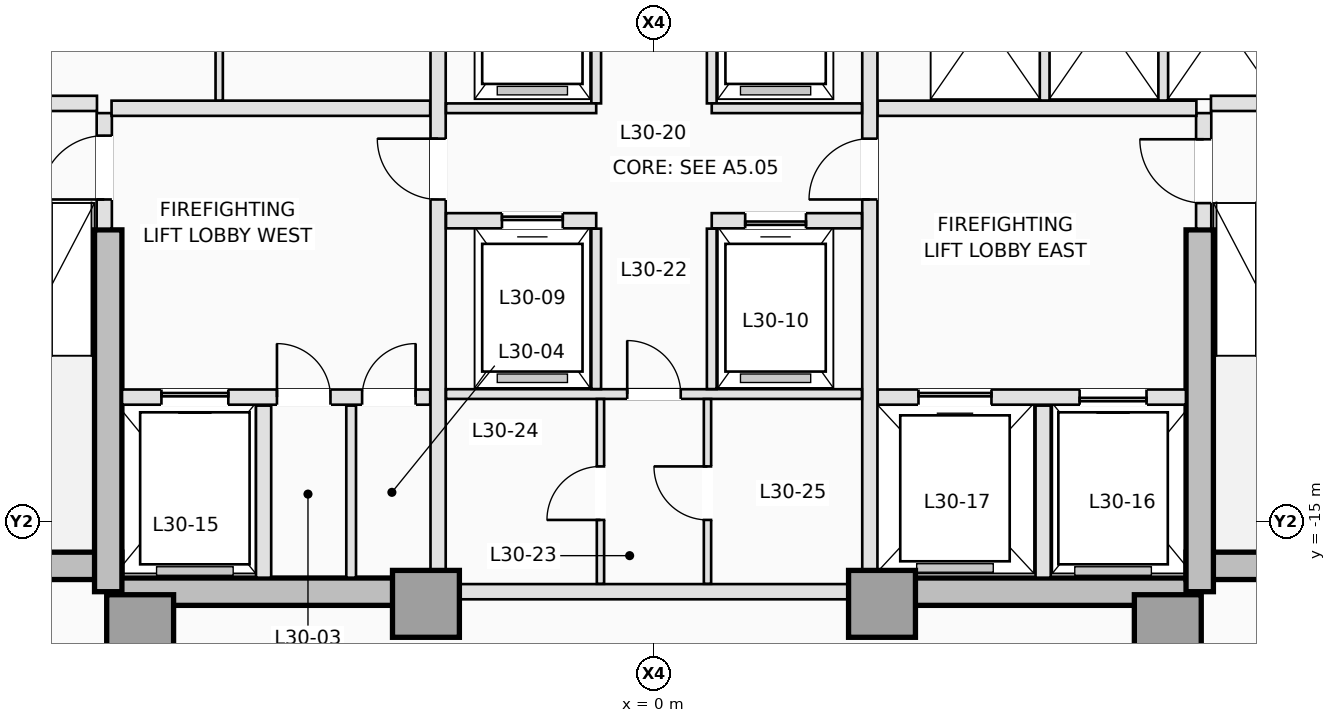
"""IFC4 building model, lengths in metres.
Left out: names, types, materials, properties, quantities, classifications, styles, units other than length and angle.
Written with IfcOpenShell. Run it as: python <this file> out.ifc"""

import sys

from ifc_helpers import new_model, si_unit, direction, frame, frame_2d, origin, origin_2d, place, context, subcontext, project, spatial, rectangle, extrude, element, fill, save


model = new_model("IFC4")
c1 = context("Model", 3, precision=1e-05, world=origin(), true_north=direction((0.0, 1.0)))
c2 = subcontext(c1, "Body", "Model", "MODEL_VIEW")
j1 = project(units=[si_unit("LENGTHUNIT", "METRE"), si_unit("PLANEANGLEUNIT", "RADIAN")], contexts=[c1])
p1 = place(None, origin())
s1 = spatial("IfcSite", under=j1, at=p1, CompositionType="ELEMENT")
p2 = place(p1, origin())
s2 = spatial("IfcBuilding", under=s1, at=p2, CompositionType="ELEMENT")
p3 = place(p2, frame((0.0, 0.0, 112.5)))
s3 = spatial("IfcBuildingStorey", under=s2, at=p3, CompositionType="ELEMENT", Elevation=112.5)
p4 = place(p3, frame((-12.65, -15.725, 0.0), z_axis=(0.0, 0.0, 1.0), x_axis=(1.0, 0.0, 0.0)))
e1 = element("IfcWall", 1, at=p4, inside=s3, PredefinedType="SHEAR", context=c2, shape_type="SweptSolid", body=[
    extrude(rectangle(XDim=3.9, YDim=0.45, at=frame_2d((1.95, 0.0))), origin(), (0.0, 0.0, 1.0), 3.5),
])
for number, where, z_axis, x_axis in (
    (2, (-8.975, -16.15, 0.0), (0.0, 0.0, 1.0), (1.0, 0.0, 0.0)),
    (3, (3.75, -16.15, 0.0), (0.0, 0.0, 1.0), (1.0, 0.0, 0.0)),
):
    element("IfcWall", number, at=place(p3, frame(where, z_axis=z_axis, x_axis=x_axis)), inside=s3, PredefinedType="SHEAR", context=c2, shape_type="SweptSolid", body=[
        extrude(rectangle(XDim=5.225, YDim=0.45, at=frame_2d((2.613, 0.0))), origin(), (0.0, 0.0, 1.0), 3.5),
    ])
p5 = place(p3, frame((8.75, -15.725, 0.0), z_axis=(0.0, 0.0, 1.0), x_axis=(1.0, 0.0, 0.0)))
e4 = element("IfcWall", 4, at=p5, inside=s3, PredefinedType="SHEAR", context=c2, shape_type="SweptSolid", body=[
    extrude(rectangle(XDim=3.9, YDim=0.45, at=frame_2d((1.95, 0.0))), origin(), (0.0, 0.0, 1.0), 3.5),
])
for number, where, z_axis, x_axis in (
    (5, (-8.975, -16.15, 0.0), (0.0, 0.0, 1.0), (0.0, 1.0, 0.0)),
    (6, (8.975, -16.15, 0.0), (0.0, 0.0, 1.0), (0.0, 1.0, 0.0)),
):
    element("IfcWall", number, at=place(p3, frame(where, z_axis=z_axis, x_axis=x_axis)), inside=s3, PredefinedType="SHEAR", context=c2, shape_type="SweptSolid", body=[
        extrude(rectangle(XDim=5.95, YDim=0.45, at=frame_2d((2.975, 0.0))), origin(), (0.0, 0.0, 1.0), 3.5),
    ])
for number, where, z_axis, x_axis in (
    (7, (-8.45, -16.75, 0.0), (0.0, 0.0, 1.0), (1.0, 0.0, 0.0)),
    (8, (-3.75, -16.35, 0.0), (0.0, 0.0, 1.0), (1.0, 0.0, 0.0)),
    (9, (3.75, -16.35, 0.0), (0.0, 0.0, 1.0), (1.0, 0.0, 0.0)),
    (10, (8.45, -16.75, 0.0), (0.0, 0.0, 1.0), (1.0, 0.0, 0.0)),
):
    element("IfcColumn", number, at=place(p3, frame(where, z_axis=z_axis, x_axis=x_axis)), inside=s3, PredefinedType="COLUMN", context=c2, shape_type="SweptSolid", body=[
        extrude(rectangle(XDim=1.1, YDim=1.1, at=origin_2d()), origin(), (0.0, 0.0, 1.0), 3.5),
    ])
p6 = place(p3, frame((-9.04, -10.18, 0.0), z_axis=(0.0, 0.0, 1.0), x_axis=(0.0, 1.0, 0.0)))
e11 = element("IfcWall", 11, at=p6, inside=s3, PredefinedType="PARTITIONING", context=c2, shape_type="SweptSolid", body=[
    extrude(rectangle(XDim=1.9, YDim=0.25, at=frame_2d((0.95, 0.0))), origin(), (0.0, 0.0, 1.0), 3.25),
])
p7 = place(p6, frame((0.48, 0.0, 0.0)))
e12 = element("IfcOpeningElement", 12, at=p7, cuts=e11, PredefinedType="OPENING", context=c2, shape_type="SweptSolid", body=[
    extrude(rectangle(XDim=1.05, YDim=2.15, at=frame_2d((0.525, 1.075))), frame((0.0, 0.135, 0.0), z_axis=(0.0, -1.0, 0.0), x_axis=(1.0, 0.0, 0.0)), (0.0, 0.0, 1.0), 0.27),
])
p8 = place(p3, frame((9.04, -10.18, 0.0), z_axis=(0.0, 0.0, 1.0), x_axis=(0.0, 1.0, 0.0)))
e13 = element("IfcWall", 13, at=p8, inside=s3, PredefinedType="PARTITIONING", context=c2, shape_type="SweptSolid", body=[
    extrude(rectangle(XDim=1.9, YDim=0.25, at=frame_2d((0.95, 0.0))), origin(), (0.0, 0.0, 1.0), 3.25),
])
p9 = place(p8, frame((0.42, 0.0, 0.0)))
e14 = element("IfcOpeningElement", 14, at=p9, cuts=e13, PredefinedType="OPENING", context=c2, shape_type="SweptSolid", body=[
    extrude(rectangle(XDim=1.05, YDim=2.15, at=frame_2d((0.525, 1.075))), frame((0.0, 0.135, 0.0), z_axis=(0.0, -1.0, 0.0), x_axis=(1.0, 0.0, 0.0)), (0.0, 0.0, 1.0), 0.27),
])
for number, where, z_axis, x_axis in (
    (15, (-12.38, -8.12, 0.0), (0.0, 0.0, 1.0), (1.0, 0.0, 0.0)),
    (16, (9.16, -8.12, 0.0), (0.0, 0.0, 1.0), (1.0, 0.0, 0.0)),
):
    element("IfcWall", number, at=place(p3, frame(where, z_axis=z_axis, x_axis=x_axis)), inside=s3, PredefinedType="PARTITIONING", context=c2, shape_type="SweptSolid", body=[
        extrude(rectangle(XDim=3.22, YDim=0.25, at=frame_2d((1.61, 0.0))), origin(), (0.0, 0.0, 1.0), 3.25),
    ])
p10 = place(p3, frame((-8.748, -12.95, 0.0), z_axis=(0.0, 0.0, 1.0), x_axis=(1.0, 0.0, 0.0)))
e17 = element("IfcWall", 17, at=p10, inside=s3, PredefinedType="PARTITIONING", context=c2, shape_type="SweptSolid", body=[
    extrude(rectangle(XDim=5.068, YDim=0.25, at=frame_2d((2.534, 0.0))), origin(), (0.0, 0.0, 1.0), 3.25),
])
p11 = place(p10, frame((0.648, 0.0, 0.0)))
e18 = element("IfcOpeningElement", 18, at=p11, cuts=e17, PredefinedType="OPENING", context=c2, shape_type="SweptSolid", body=[
    extrude(rectangle(XDim=1.1, YDim=2.15, at=frame_2d((0.55, 1.075))), frame((0.0, 0.135, 0.0), z_axis=(0.0, -1.0, 0.0), x_axis=(1.0, 0.0, 0.0)), (0.0, 0.0, 1.0), 0.27),
])
p12 = place(p10, frame((2.548, 0.0, 0.0)))
e19 = element("IfcOpeningElement", 19, at=p12, cuts=e17, PredefinedType="OPENING", context=c2, shape_type="SweptSolid", body=[
    extrude(rectangle(XDim=0.88, YDim=2.1, at=frame_2d((0.44, 1.05))), frame((0.0, 0.135, 0.0), z_axis=(0.0, -1.0, 0.0), x_axis=(1.0, 0.0, 0.0)), (0.0, 0.0, 1.0), 0.27),
])
p13 = place(p10, frame((3.948, 0.0, 0.0)))
e20 = element("IfcOpeningElement", 20, at=p13, cuts=e17, PredefinedType="OPENING", context=c2, shape_type="SweptSolid", body=[
    extrude(rectangle(XDim=0.88, YDim=2.1, at=frame_2d((0.44, 1.05))), frame((0.0, 0.135, 0.0), z_axis=(0.0, -1.0, 0.0), x_axis=(1.0, 0.0, 0.0)), (0.0, 0.0, 1.0), 0.27),
])
p14 = place(p3, frame((3.68, -12.95, 0.0), z_axis=(0.0, 0.0, 1.0), x_axis=(1.0, 0.0, 0.0)))
e21 = element("IfcWall", 21, at=p14, inside=s3, PredefinedType="PARTITIONING", context=c2, shape_type="SweptSolid", body=[
    extrude(rectangle(XDim=5.068, YDim=0.25, at=frame_2d((2.534, 0.0))), origin(), (0.0, 0.0, 1.0), 3.25),
])
p15 = place(p14, frame((3.32, 0.0, 0.0)))
e22 = element("IfcOpeningElement", 22, at=p15, cuts=e21, PredefinedType="OPENING", context=c2, shape_type="SweptSolid", body=[
    extrude(rectangle(XDim=1.1, YDim=2.15, at=frame_2d((0.55, 1.075))), frame((0.0, 0.135, 0.0), z_axis=(0.0, -1.0, 0.0), x_axis=(1.0, 0.0, 0.0)), (0.0, 0.0, 1.0), 0.27),
])
p16 = place(p14, frame((0.67, 0.0, 0.0)))
e23 = element("IfcOpeningElement", 23, at=p16, cuts=e21, PredefinedType="OPENING", context=c2, shape_type="SweptSolid", body=[
    extrude(rectangle(XDim=1.2, YDim=2.15, at=frame_2d((0.6, 1.075))), frame((0.0, 0.135, 0.0), z_axis=(0.0, -1.0, 0.0), x_axis=(1.0, 0.0, 0.0)), (0.0, 0.0, 1.0), 0.27),
])
p17 = place(p3, frame((-6.42, -15.92, 0.0), z_axis=(0.0, 0.0, 1.0), x_axis=(0.0, 1.0, 0.0)))
e24 = element("IfcWall", 24, at=p17, inside=s3, PredefinedType="PARTITIONING", context=c2, shape_type="SweptSolid", body=[
    extrude(rectangle(XDim=2.83, YDim=0.25, at=frame_2d((1.415, 0.0))), origin(), (0.0, 0.0, 1.0), 3.25),
])
p18 = place(p3, frame((-4.98, -15.92, 0.0), z_axis=(0.0, 0.0, 1.0), x_axis=(0.0, 1.0, 0.0)))
e25 = element("IfcWall", 25, at=p18, inside=s3, PredefinedType="PARTITIONING", context=c2, shape_type="SweptSolid", body=[
    extrude(rectangle(XDim=2.83, YDim=0.16, at=frame_2d((1.415, 0.0))), origin(), (0.0, 0.0, 1.0), 3.25),
])
p19 = place(p3, frame((6.4, -15.92, 0.0), z_axis=(0.0, 0.0, 1.0), x_axis=(0.0, 1.0, 0.0)))
e26 = element("IfcWall", 26, at=p19, inside=s3, PredefinedType="PARTITIONING", context=c2, shape_type="SweptSolid", body=[
    extrude(rectangle(XDim=2.83, YDim=0.25, at=frame_2d((1.415, 0.0))), origin(), (0.0, 0.0, 1.0), 3.25),
])
for number, where, z_axis, x_axis in (
    (27, (-8.92, -8.2, 0.0), (0.0, 0.0, 1.0), (1.0, 0.0, 0.0)),
    (28, (3.68, -8.2, 0.0), (0.0, 0.0, 1.0), (1.0, 0.0, 0.0)),
):
    element("IfcWall", number, at=place(p3, frame(where, z_axis=z_axis, x_axis=x_axis)), inside=s3, PredefinedType="PARTITIONING", context=c2, shape_type="SweptSolid", body=[
        extrude(rectangle(XDim=5.24, YDim=0.25, at=frame_2d((2.62, 0.0))), origin(), (0.0, 0.0, 1.0), 3.25),
    ])
p20 = place(p3, frame((-3.55, -15.798, 0.0), z_axis=(0.0, 0.0, 1.0), x_axis=(0.0, 1.0, 0.0)))
e29 = element("IfcWall", 29, at=p20, inside=s3, PredefinedType="PARTITIONING", context=c2, shape_type="SweptSolid", body=[
    extrude(rectangle(XDim=10.446, YDim=0.25, at=frame_2d((5.223, 0.0))), origin(), (0.0, 0.0, 1.0), 3.25),
])
p21 = place(p20, frame((6.098, 0.0, 0.0)))
e30 = element("IfcOpeningElement", 30, at=p21, cuts=e29, PredefinedType="OPENING", context=c2, shape_type="SweptSolid", body=[
    extrude(rectangle(XDim=1.0, YDim=2.15, at=frame_2d((0.5, 1.075))), frame((0.0, 0.135, 0.0), z_axis=(0.0, -1.0, 0.0), x_axis=(1.0, 0.0, 0.0)), (0.0, 0.0, 1.0), 0.27),
])
p22 = place(p3, frame((3.55, -15.798, 0.0), z_axis=(0.0, 0.0, 1.0), x_axis=(0.0, 1.0, 0.0)))
e31 = element("IfcWall", 31, at=p22, inside=s3, PredefinedType="PARTITIONING", context=c2, shape_type="SweptSolid", body=[
    extrude(rectangle(XDim=10.446, YDim=0.25, at=frame_2d((5.223, 0.0))), origin(), (0.0, 0.0, 1.0), 3.25),
])
p23 = place(p22, frame((6.098, 0.0, 0.0)))
e32 = element("IfcOpeningElement", 32, at=p23, cuts=e31, PredefinedType="OPENING", context=c2, shape_type="SweptSolid", body=[
    extrude(rectangle(XDim=1.0, YDim=2.15, at=frame_2d((0.5, 1.075))), frame((0.0, 0.135, 0.0), z_axis=(0.0, -1.0, 0.0), x_axis=(1.0, 0.0, 0.0)), (0.0, 0.0, 1.0), 0.27),
])
p24 = place(p3, frame((-7.15, -8.073, 0.0), z_axis=(0.0, 0.0, 1.0), x_axis=(0.0, 1.0, 0.0)))
e33 = element("IfcWall", 33, at=p24, inside=s3, PredefinedType="PARTITIONING", context=c2, shape_type="SweptSolid", body=[
    extrude(rectangle(XDim=2.733, YDim=0.12, at=frame_2d((1.366, 0.0))), origin(), (0.0, 0.0, 1.0), 3.25),
])
for number, where, z_axis, x_axis in (
    (34, (6.425, -8.073, 0.0), (0.0, 0.0, 1.0), (0.0, 1.0, 0.0)),
    (35, (8.375, -8.073, 0.0), (0.0, 0.0, 1.0), (0.0, 1.0, 0.0)),
):
    element("IfcWall", number, at=place(p3, frame(where, z_axis=z_axis, x_axis=x_axis)), inside=s3, PredefinedType="PARTITIONING", context=c2, shape_type="SweptSolid", body=[
        extrude(rectangle(XDim=2.733, YDim=0.16, at=frame_2d((1.366, 0.0))), origin(), (0.0, 0.0, 1.0), 3.25),
    ])
p25 = place(p3, frame((-3.198, -16.15, 0.0), z_axis=(0.0, 0.0, 1.0), x_axis=(1.0, 0.0, 0.0)))
e36 = element("IfcWall", 36, at=p25, inside=s3, PredefinedType="PARTITIONING", context=c2, shape_type="SweptSolid", body=[
    extrude(rectangle(XDim=6.396, YDim=0.25, at=frame_2d((3.198, 0.0))), origin(), (0.0, 0.0, 1.0), 2.3),
])
for number, where, z_axis, x_axis in (
    (37, (-0.95, -8.12, 0.0), (0.0, 0.0, 1.0), (0.0, 1.0, 0.0)),
    (38, (0.95, -8.12, 0.0), (0.0, 0.0, 1.0), (0.0, 1.0, 0.0)),
):
    element("IfcWall", number, at=place(p3, frame(where, z_axis=z_axis, x_axis=x_axis)), inside=s3, PredefinedType="PARTITIONING", context=c2, shape_type="SweptSolid", body=[
        extrude(rectangle(XDim=2.78, YDim=0.16, at=frame_2d((1.39, 0.0))), origin(), (0.0, 0.0, 1.0), 3.25),
    ])
for number, where, z_axis, x_axis in (
    (39, (-3.42, -8.2, 0.0), (0.0, 0.0, 1.0), (1.0, 0.0, 0.0)),
    (40, (0.95, -8.2, 0.0), (0.0, 0.0, 1.0), (1.0, 0.0, 0.0)),
):
    element("IfcWall", number, at=place(p3, frame(where, z_axis=z_axis, x_axis=x_axis)), inside=s3, PredefinedType="PARTITIONING", context=c2, shape_type="SweptSolid", body=[
        extrude(rectangle(XDim=2.47, YDim=0.16, at=frame_2d((1.235, 0.0))), origin(), (0.0, 0.0, 1.0), 3.25),
    ])
p26 = place(p3, frame((-3.42, -10.05, 0.0), z_axis=(0.0, 0.0, 1.0), x_axis=(1.0, 0.0, 0.0)))
e41 = element("IfcWall", 41, at=p26, inside=s3, PredefinedType="PARTITIONING", context=c2, shape_type="SweptSolid", body=[
    extrude(rectangle(XDim=2.47, YDim=0.25, at=frame_2d((1.235, 0.0))), origin(), (0.0, 0.0, 1.0), 3.25),
])
p27 = place(p26, frame((0.92, 0.0, 0.0)))
e42 = element("IfcOpeningElement", 42, at=p27, cuts=e41, PredefinedType="OPENING", context=c2, shape_type="SweptSolid", body=[
    extrude(rectangle(XDim=1.0, YDim=2.15, at=frame_2d((0.5, 1.075))), frame((0.0, 0.135, 0.0), z_axis=(0.0, -1.0, 0.0), x_axis=(1.0, 0.0, 0.0)), (0.0, 0.0, 1.0), 0.27),
])
p28 = place(p3, frame((0.95, -10.05, 0.0), z_axis=(0.0, 0.0, 1.0), x_axis=(1.0, 0.0, 0.0)))
e43 = element("IfcWall", 43, at=p28, inside=s3, PredefinedType="PARTITIONING", context=c2, shape_type="SweptSolid", body=[
    extrude(rectangle(XDim=2.47, YDim=0.25, at=frame_2d((1.235, 0.0))), origin(), (0.0, 0.0, 1.0), 3.25),
])
p29 = place(p28, frame((0.55, 0.0, 0.0)))
e44 = element("IfcOpeningElement", 44, at=p29, cuts=e43, PredefinedType="OPENING", context=c2, shape_type="SweptSolid", body=[
    extrude(rectangle(XDim=1.0, YDim=2.15, at=frame_2d((0.5, 1.075))), frame((0.0, 0.135, 0.0), z_axis=(0.0, -1.0, 0.0), x_axis=(1.0, 0.0, 0.0)), (0.0, 0.0, 1.0), 0.27),
])
p30 = place(p3, frame((-3.42, -12.9, 0.0), z_axis=(0.0, 0.0, 1.0), x_axis=(1.0, 0.0, 0.0)))
e45 = element("IfcWall", 45, at=p30, inside=s3, PredefinedType="PARTITIONING", context=c2, shape_type="SweptSolid", body=[
    extrude(rectangle(XDim=6.84, YDim=0.16, at=frame_2d((3.42, 0.0))), origin(), (0.0, 0.0, 1.0), 3.25),
])
p31 = place(p30, frame((2.98, 0.0, 0.0)))
e46 = element("IfcOpeningElement", 46, at=p31, cuts=e45, PredefinedType="OPENING", context=c2, shape_type="SweptSolid", body=[
    extrude(rectangle(XDim=0.88, YDim=2.12, at=frame_2d((0.44, 1.06))), frame((0.0, 0.09, 0.0), z_axis=(0.0, -1.0, 0.0), x_axis=(1.0, 0.0, 0.0)), (0.0, 0.0, 1.0), 0.18),
])
for number, where, z_axis, x_axis in (
    (47, (-0.95, -12.818, 0.0), (0.0, 0.0, 1.0), (0.0, 1.0, 0.0)),
    (48, (0.95, -12.818, 0.0), (0.0, 0.0, 1.0), (0.0, 1.0, 0.0)),
):
    element("IfcWall", number, at=place(p3, frame(where, z_axis=z_axis, x_axis=x_axis)), inside=s3, PredefinedType="PARTITIONING", context=c2, shape_type="SweptSolid", body=[
        extrude(rectangle(XDim=2.638, YDim=0.16, at=frame_2d((1.319, 0.0))), origin(), (0.0, 0.0, 1.0), 3.25),
    ])
p32 = place(p3, frame((-0.88, -16.02, 0.0), z_axis=(0.0, 0.0, 1.0), x_axis=(0.0, 1.0, 0.0)))
e49 = element("IfcWall", 49, at=p32, inside=s3, PredefinedType="PARTITIONING", context=c2, shape_type="SweptSolid", body=[
    extrude(rectangle(XDim=3.038, YDim=0.12, at=frame_2d((1.519, 0.0))), origin(), (0.0, 0.0, 1.0), 3.25),
])
p33 = place(p32, frame((1.05, 0.0, 0.0)))
e50 = element("IfcOpeningElement", 50, at=p33, cuts=e49, PredefinedType="OPENING", context=c2, shape_type="SweptSolid", body=[
    extrude(rectangle(XDim=0.88, YDim=2.12, at=frame_2d((0.44, 1.06))), frame((0.0, 0.07, 0.0), z_axis=(0.0, -1.0, 0.0), x_axis=(1.0, 0.0, 0.0)), (0.0, 0.0, 1.0), 0.14),
])
p34 = place(p3, frame((0.88, -16.02, 0.0), z_axis=(0.0, 0.0, 1.0), x_axis=(0.0, 1.0, 0.0)))
e51 = element("IfcWall", 51, at=p34, inside=s3, PredefinedType="PARTITIONING", context=c2, shape_type="SweptSolid", body=[
    extrude(rectangle(XDim=3.038, YDim=0.12, at=frame_2d((1.519, 0.0))), origin(), (0.0, 0.0, 1.0), 3.25),
])
p35 = place(p34, frame((1.05, 0.0, 0.0)))
e52 = element("IfcOpeningElement", 52, at=p35, cuts=e51, PredefinedType="OPENING", context=c2, shape_type="SweptSolid", body=[
    extrude(rectangle(XDim=0.88, YDim=2.12, at=frame_2d((0.44, 1.06))), frame((0.0, 0.07, 0.0), z_axis=(0.0, -1.0, 0.0), x_axis=(1.0, 0.0, 0.0)), (0.0, 0.0, 1.0), 0.14),
])
p36 = place(p11, origin())
e53 = element("IfcDoor", 53, at=p36, inside=s3, OperationType="SLIDING_TO_LEFT", PredefinedType="DOOR", context=c2, shape_type="SweptSolid", body=[
    extrude(rectangle(XDim=1.1, YDim=2.15, at=frame_2d((0.55, 1.075))), frame((0.0, 0.025, 0.0), z_axis=(0.0, -1.0, 0.0), x_axis=(1.0, 0.0, 0.0)), (0.0, 0.0, 1.0), 0.05),
])
fill(e18, e53)
p37 = place(p15, origin())
e54 = element("IfcDoor", 54, at=p37, inside=s3, OperationType="SLIDING_TO_RIGHT", PredefinedType="DOOR", context=c2, shape_type="SweptSolid", body=[
    extrude(rectangle(XDim=1.1, YDim=2.15, at=frame_2d((0.55, 1.075))), frame((0.0, 0.025, 0.0), z_axis=(0.0, -1.0, 0.0), x_axis=(1.0, 0.0, 0.0)), (0.0, 0.0, 1.0), 0.05),
])
fill(e22, e54)
p38 = place(p16, origin())
e55 = element("IfcDoor", 55, at=p38, inside=s3, OperationType="SLIDING_TO_LEFT", PredefinedType="DOOR", context=c2, shape_type="SweptSolid", body=[
    extrude(rectangle(XDim=1.2, YDim=2.15, at=frame_2d((0.6, 1.075))), frame((0.0, 0.025, 0.0), z_axis=(0.0, -1.0, 0.0), x_axis=(1.0, 0.0, 0.0)), (0.0, 0.0, 1.0), 0.05),
])
fill(e23, e55)
p39 = place(p27, origin())
e56 = element("IfcDoor", 56, at=p39, inside=s3, OperationType="SLIDING_TO_LEFT", PredefinedType="DOOR", context=c2, shape_type="SweptSolid", body=[
    extrude(rectangle(XDim=1.0, YDim=2.15, at=frame_2d((0.5, 1.075))), frame((0.0, 0.025, 0.0), z_axis=(0.0, -1.0, 0.0), x_axis=(1.0, 0.0, 0.0)), (0.0, 0.0, 1.0), 0.05),
])
fill(e42, e56)
p40 = place(p29, origin())
e57 = element("IfcDoor", 57, at=p40, inside=s3, OperationType="SLIDING_TO_RIGHT", PredefinedType="DOOR", context=c2, shape_type="SweptSolid", body=[
    extrude(rectangle(XDim=1.0, YDim=2.15, at=frame_2d((0.5, 1.075))), frame((0.0, 0.025, 0.0), z_axis=(0.0, -1.0, 0.0), x_axis=(1.0, 0.0, 0.0)), (0.0, 0.0, 1.0), 0.05),
])
fill(e44, e57)
p41 = place(p7, origin())
e58 = element("IfcDoor", 58, at=p41, inside=s3, OperationType="SINGLE_SWING_LEFT", PredefinedType="DOOR", context=c2, shape_type="SweptSolid", body=[
    extrude(rectangle(XDim=1.05, YDim=2.15, at=frame_2d((0.525, 1.075))), frame((0.0, 0.025, 0.0), z_axis=(0.0, -1.0, 0.0), x_axis=(1.0, 0.0, 0.0)), (0.0, 0.0, 1.0), 0.05),
])
fill(e12, e58)
p42 = place(p9, origin())
e59 = element("IfcDoor", 59, at=p42, inside=s3, OperationType="SINGLE_SWING_RIGHT", PredefinedType="DOOR", context=c2, shape_type="SweptSolid", body=[
    extrude(rectangle(XDim=1.05, YDim=2.15, at=frame_2d((0.525, 1.075))), frame((0.0, 0.025, 0.0), z_axis=(0.0, -1.0, 0.0), x_axis=(1.0, 0.0, 0.0)), (0.0, 0.0, 1.0), 0.05),
])
fill(e14, e59)
p43 = place(p12, origin())
e60 = element("IfcDoor", 60, at=p43, inside=s3, OperationType="SINGLE_SWING_LEFT", PredefinedType="TRAPDOOR", context=c2, shape_type="SweptSolid", body=[
    extrude(rectangle(XDim=0.88, YDim=2.1, at=frame_2d((0.44, 1.05))), frame((0.0, 0.025, 0.0), z_axis=(0.0, -1.0, 0.0), x_axis=(1.0, 0.0, 0.0)), (0.0, 0.0, 1.0), 0.05),
])
fill(e19, e60)
p44 = place(p13, origin())
e61 = element("IfcDoor", 61, at=p44, inside=s3, OperationType="SINGLE_SWING_RIGHT", PredefinedType="TRAPDOOR", context=c2, shape_type="SweptSolid", body=[
    extrude(rectangle(XDim=0.88, YDim=2.1, at=frame_2d((0.44, 1.05))), frame((0.0, 0.025, 0.0), z_axis=(0.0, -1.0, 0.0), x_axis=(1.0, 0.0, 0.0)), (0.0, 0.0, 1.0), 0.05),
])
fill(e20, e61)
p45 = place(p21, origin())
e62 = element("IfcDoor", 62, at=p45, inside=s3, OperationType="SINGLE_SWING_RIGHT", PredefinedType="DOOR", context=c2, shape_type="SweptSolid", body=[
    extrude(rectangle(XDim=1.0, YDim=2.15, at=frame_2d((0.5, 1.075))), frame((0.0, 0.025, 0.0), z_axis=(0.0, -1.0, 0.0), x_axis=(1.0, 0.0, 0.0)), (0.0, 0.0, 1.0), 0.05),
])
fill(e30, e62)
p46 = place(p23, origin())
e63 = element("IfcDoor", 63, at=p46, inside=s3, OperationType="SINGLE_SWING_LEFT", PredefinedType="DOOR", context=c2, shape_type="SweptSolid", body=[
    extrude(rectangle(XDim=1.0, YDim=2.15, at=frame_2d((0.5, 1.075))), frame((0.0, 0.025, 0.0), z_axis=(0.0, -1.0, 0.0), x_axis=(1.0, 0.0, 0.0)), (0.0, 0.0, 1.0), 0.05),
])
fill(e32, e63)
p47 = place(p31, origin())
e64 = element("IfcDoor", 64, at=p47, inside=s3, OperationType="SINGLE_SWING_LEFT", PredefinedType="DOOR", context=c2, shape_type="SweptSolid", body=[
    extrude(rectangle(XDim=0.88, YDim=2.12, at=frame_2d((0.44, 1.06))), frame((0.0, 0.025, 0.0), z_axis=(0.0, -1.0, 0.0), x_axis=(1.0, 0.0, 0.0)), (0.0, 0.0, 1.0), 0.05),
])
fill(e46, e64)
p48 = place(p33, origin())
e65 = element("IfcDoor", 65, at=p48, inside=s3, OperationType="SINGLE_SWING_LEFT", PredefinedType="DOOR", context=c2, shape_type="SweptSolid", body=[
    extrude(rectangle(XDim=0.88, YDim=2.12, at=frame_2d((0.44, 1.06))), frame((0.0, 0.025, 0.0), z_axis=(0.0, -1.0, 0.0), x_axis=(1.0, 0.0, 0.0)), (0.0, 0.0, 1.0), 0.05),
])
fill(e50, e65)
p49 = place(p35, origin())
e66 = element("IfcDoor", 66, at=p49, inside=s3, OperationType="SINGLE_SWING_RIGHT", PredefinedType="DOOR", context=c2, shape_type="SweptSolid", body=[
    extrude(rectangle(XDim=0.88, YDim=2.12, at=frame_2d((0.44, 1.06))), frame((0.0, 0.025, 0.0), z_axis=(0.0, -1.0, 0.0), x_axis=(1.0, 0.0, 0.0)), (0.0, 0.0, 1.0), 0.05),
])
fill(e52, e66)
save(model, sys.argv[1])
